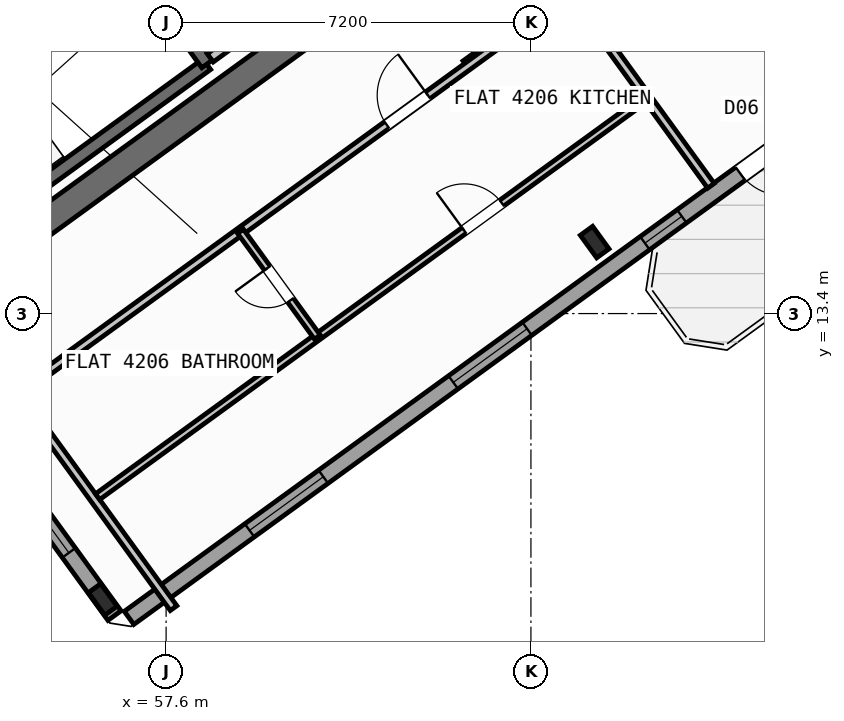
"""IFC4 building model, lengths in metres.
Left out: names, types, materials, properties, quantities, classifications, styles, units other than length and angle.
Written with IfcOpenShell. Run it as: python <this file> out.ifc"""

import sys

from ifc_helpers import new_model, si_unit, direction, frame, frame_2d, origin, origin_2d, place, context, subcontext, project, spatial, rectangle, i_section, extrude, source, transform, mapped, element, fill, save


model = new_model("IFC4")
c1 = context("Model", 3, precision=1e-05, world=origin(), true_north=direction((0.0, 1.0)))
c2 = subcontext(c1, "Body", "Model", "MODEL_VIEW")
j1 = project(units=[si_unit("LENGTHUNIT", "METRE"), si_unit("PLANEANGLEUNIT", "RADIAN")], contexts=[c1])
p1 = place(None, origin())
s1 = spatial("IfcSite", under=j1, at=p1, CompositionType="ELEMENT")
p2 = place(p1, origin())
s2 = spatial("IfcBuilding", under=s1, at=p2, CompositionType="ELEMENT")
p3 = place(p2, frame((0.0, 0.0, 165.9)))
s3 = spatial("IfcBuildingStorey", under=s2, at=p3, CompositionType="ELEMENT", Elevation=165.9)
p4 = place(p3, frame((52.359, 13.14, 0.0), z_axis=(0.0, 0.0, 1.0), x_axis=(0.809014896919, 0.587788139183, 0.0)))
e1 = element("IfcWall", 1, at=p4, inside=s3, PredefinedType="SHEAR", context=c2, shape_type="SweptSolid", body=[
    extrude(rectangle(XDim=12.34, YDim=0.55, at=frame_2d((6.17, 0.0))), origin(), (0.0, 0.0, 1.0), 3.32),
])
m1 = source(origin(), c2, "Body", "SweptSolid", [
    extrude(i_section(OverallWidth=0.3, OverallDepth=0.55, WebThickness=0.015, FlangeThickness=0.029, at=origin_2d()), origin(), (0.0, 0.0, 1.0), 3.6),
])
for number, where, z_axis, x_axis in (
    (2, (56.35, 7.758, 0.0), (0.0, 0.0, 1.0), (0.809, 0.588, 0.0)),
    (3, (66.058, 14.811, 0.0), (0.0, 0.0, 1.0), (0.809, 0.588, 0.0)),
):
    element("IfcColumn", number, at=place(p3, frame(where, z_axis=z_axis, x_axis=x_axis)), inside=s3, PredefinedType="COLUMN", context=c2, shape_type="MappedRepresentation", body=[
        mapped(m1, transform((0.0, 0.0, 0.0), scale=1.0)),
    ])
p5 = place(p3, frame((58.455, 35.484, 0.0), z_axis=(0.0, 0.0, 1.0), x_axis=(0.587783625747, -0.809018176127, 0.0)))
e4 = element("IfcWall", 4, at=p5, inside=s3, PredefinedType="STANDARD", context=c2, shape_type="SweptSolid", body=[
    extrude(rectangle(XDim=21.587, YDim=0.32, at=frame_2d((10.794, 0.0))), origin(), (0.0, 0.0, 1.0), 2.795),
])
p6 = place(p5, frame((1.475, 0.0, 0.8)))
e5 = element("IfcOpeningElement", 5, at=p6, cuts=e4, PredefinedType="OPENING", context=c2, shape_type="SweptSolid", body=[
    extrude(rectangle(XDim=2.1, YDim=1.55, at=frame_2d((1.05, 0.775))), frame((0.0, 0.17, 0.0), z_axis=(0.0, -1.0, 0.0), x_axis=(1.0, 0.0, 0.0)), (0.0, 0.0, 1.0), 0.34),
])
p7 = place(p5, frame((5.13, 0.0, 0.85)))
e6 = element("IfcOpeningElement", 6, at=p7, cuts=e4, PredefinedType="OPENING", context=c2, shape_type="SweptSolid", body=[
    extrude(rectangle(XDim=1.5, YDim=1.5, at=frame_2d((0.75, 0.75))), frame((0.0, 0.17, 0.0), z_axis=(0.0, -1.0, 0.0), x_axis=(1.0, 0.0, 0.0)), (0.0, 0.0, 1.0), 0.34),
])
p8 = place(p5, frame((8.929, 0.0, 0.85)))
e7 = element("IfcOpeningElement", 7, at=p8, cuts=e4, PredefinedType="OPENING", context=c2, shape_type="SweptSolid", body=[
    extrude(rectangle(XDim=1.5, YDim=1.5, at=frame_2d((0.75, 0.75))), frame((0.0, 0.17, 0.0), z_axis=(0.0, -1.0, 0.0), x_axis=(1.0, 0.0, 0.0)), (0.0, 0.0, 1.0), 0.34),
])
p9 = place(p5, frame((17.581, 0.0, 0.95)))
e8 = element("IfcOpeningElement", 8, at=p9, cuts=e4, PredefinedType="OPENING", context=c2, shape_type="SweptSolid", body=[
    extrude(rectangle(XDim=1.2, YDim=1.4, at=frame_2d((0.6, 0.7))), frame((0.0, 0.17, 0.0), z_axis=(0.0, -1.0, 0.0), x_axis=(1.0, 0.0, 0.0)), (0.0, 0.0, 1.0), 0.34),
])
p10 = place(p3, frame((71.098, 17.731, 0.0), z_axis=(0.0, 0.0, 1.0), x_axis=(-0.809021120468, -0.587779573171, 0.0)))
e9 = element("IfcWall", 9, at=p10, inside=s3, PredefinedType="STANDARD", context=c2, shape_type="SweptSolid", body=[
    extrude(rectangle(XDim=17.588, YDim=0.32, at=frame_2d((8.794, 0.0))), origin(), (0.0, 0.0, 1.0), 3.32),
])
p11 = place(p10, frame((1.624, 0.0, 0.0)))
e10 = element("IfcOpeningElement", 10, at=p11, cuts=e9, PredefinedType="OPENING", context=c2, shape_type="SweptSolid", body=[
    extrude(rectangle(XDim=1.05, YDim=2.15, at=frame_2d((0.525, 1.075))), frame((0.0, 0.17, 0.0), z_axis=(0.0, -1.0, 0.0), x_axis=(1.0, 0.0, 0.0)), (0.0, 0.0, 1.0), 0.34),
])
p12 = place(p10, frame((4.104, 0.0, 1.0)))
e11 = element("IfcOpeningElement", 11, at=p12, cuts=e9, PredefinedType="OPENING", context=c2, shape_type="SweptSolid", body=[
    extrude(rectangle(XDim=0.9, YDim=1.25, at=frame_2d((0.45, 0.625))), frame((0.0, 0.17, 0.0), z_axis=(0.0, -1.0, 0.0), x_axis=(1.0, 0.0, 0.0)), (0.0, 0.0, 1.0), 0.34),
])
p13 = place(p10, frame((7.879, 0.0, 0.85)))
e12 = element("IfcOpeningElement", 12, at=p13, cuts=e9, PredefinedType="OPENING", context=c2, shape_type="SweptSolid", body=[
    extrude(rectangle(XDim=1.8, YDim=1.5, at=frame_2d((0.9, 0.75))), frame((0.0, 0.17, 0.0), z_axis=(0.0, -1.0, 0.0), x_axis=(1.0, 0.0, 0.0)), (0.0, 0.0, 1.0), 0.34),
])
p14 = place(p10, frame((12.849, 0.0, 0.85)))
e13 = element("IfcOpeningElement", 13, at=p14, cuts=e9, PredefinedType="OPENING", context=c2, shape_type="SweptSolid", body=[
    extrude(rectangle(XDim=1.8, YDim=1.5, at=frame_2d((0.9, 0.75))), frame((0.0, 0.17, 0.0), z_axis=(0.0, -1.0, 0.0), x_axis=(1.0, 0.0, 0.0)), (0.0, 0.0, 1.0), 0.34),
])
p15 = place(p3, frame((56.581, 7.439, 0.0), z_axis=(0.0, 0.0, 1.0), x_axis=(-0.587771678454, 0.809026856172, 0.0)))
e14 = element("IfcWall", 14, at=p15, inside=s3, PredefinedType="STANDARD", context=c2, shape_type="SweptSolid", body=[
    extrude(rectangle(XDim=6.824, YDim=0.32, at=frame_2d((3.412, 0.0))), origin(), (0.0, 0.0, 1.0), 2.795),
])
p16 = place(p15, frame((1.531, 0.0, 0.8)))
e15 = element("IfcOpeningElement", 15, at=p16, cuts=e14, PredefinedType="OPENING", context=c2, shape_type="SweptSolid", body=[
    extrude(rectangle(XDim=2.1, YDim=1.55, at=frame_2d((1.05, 0.775))), frame((0.0, 0.17, 0.0), z_axis=(0.0, -1.0, 0.0), x_axis=(1.0, 0.0, 0.0)), (0.0, 0.0, 1.0), 0.34),
])
p17 = place(p3, frame((52.472, 14.013, 0.0), z_axis=(0.0, 0.0, 1.0), x_axis=(0.809028366311, 0.587769599847, 0.0)))
e16 = element("IfcWall", 16, at=p17, inside=s3, PredefinedType="SHEAR", context=c2, shape_type="SweptSolid", body=[
    extrude(rectangle(XDim=7.33, YDim=0.26, at=frame_2d((3.665, 0.0))), origin(), (0.0, 0.0, 1.0), 3.32),
])
p18 = place(p3, frame((50.615, 16.57, 0.0), z_axis=(0.0, 0.0, 1.0), x_axis=(0.809028366311, 0.587769599847, 0.0)))
e17 = element("IfcWall", 17, at=p18, inside=s3, PredefinedType="SHEAR", context=c2, shape_type="SweptSolid", body=[
    extrude(rectangle(XDim=7.33, YDim=0.26, at=frame_2d((3.665, 0.0))), origin(), (0.0, 0.0, 1.0), 3.32),
])
p19 = place(p18, frame((0.22, 0.0, 0.0)))
e18 = element("IfcOpeningElement", 18, at=p19, cuts=e17, PredefinedType="OPENING", context=c2, shape_type="SweptSolid", body=[
    extrude(rectangle(XDim=1.1, YDim=2.1, at=frame_2d((0.55, 1.05))), frame((0.0, 0.14, 0.0), z_axis=(0.0, -1.0, 0.0), x_axis=(1.0, 0.0, 0.0)), (0.0, 0.0, 1.0), 0.28),
])
p20 = place(p3, frame((58.41, 18.327, 0.0), z_axis=(0.0, 0.0, 1.0), x_axis=(-0.58776738483, 0.809029975545, 0.0)))
e19 = element("IfcWall", 19, at=p20, inside=s3, PredefinedType="SHEAR", context=c2, shape_type="SweptSolid", body=[
    extrude(rectangle(XDim=3.16, YDim=0.26, at=frame_2d((1.58, 0.0))), origin(), (0.0, 0.0, 1.0), 3.32),
])
p21 = place(p3, frame((58.472, 18.447, 0.0), z_axis=(0.0, 0.0, 1.0), x_axis=(0.809018631237, 0.587782999339, 0.0)))
e20 = element("IfcWall", 20, at=p21, inside=s3, PredefinedType="STANDARD", context=c2, shape_type="SweptSolid", body=[
    extrude(rectangle(XDim=3.698, YDim=0.2, at=frame_2d((1.849, 0.0))), origin(), (0.0, 0.0, 1.0), 3.31),
])
p22 = place(p3, frame((63.507, 18.322, 0.0), z_axis=(0.0, 0.0, 1.0), x_axis=(0.809034604122, 0.587761013791, 0.0)))
e21 = element("IfcWall", 21, at=p22, inside=s3, PredefinedType="PARTITIONING", context=c2, shape_type="SweptSolid", body=[
    extrude(rectangle(XDim=2.51, YDim=0.16, at=frame_2d((1.255, 0.0))), origin(), (0.0, 0.0, 1.0), 3.31),
])
p23 = place(p3, frame((68.353, 15.922, 0.0), z_axis=(0.0, 0.0, 1.0), x_axis=(-0.58776839458, 0.809029241952, 0.0)))
e22 = element("IfcWall", 22, at=p23, inside=s3, PredefinedType="PARTITIONING", context=c2, shape_type="SweptSolid", body=[
    extrude(rectangle(XDim=8.1, YDim=0.16, at=frame_2d((4.05, 0.0))), origin(), (0.0, 0.0, 1.0), 3.31),
])
p24 = place(p3, frame((53.705, 11.126, 0.0), z_axis=(0.0, 0.0, 1.0), x_axis=(0.809014504436, 0.587788679384, 0.0)))
e23 = element("IfcWall", 23, at=p24, inside=s3, PredefinedType="PARTITIONING", context=c2, shape_type="SweptSolid", body=[
    extrude(rectangle(XDim=14.67, YDim=0.16, at=frame_2d((7.335, 0.0))), origin(), (0.0, 0.0, 1.0), 3.31),
])
p25 = place(p24, frame((10.2, 0.0, 0.0)))
e24 = element("IfcOpeningElement", 24, at=p25, cuts=e23, PredefinedType="OPENING", context=c2, shape_type="SweptSolid", body=[
    extrude(rectangle(XDim=1.0, YDim=2.1, at=frame_2d((0.5, 1.05))), frame((0.0, 0.09, 0.0), z_axis=(0.0, -1.0, 0.0), x_axis=(1.0, 0.0, 0.0)), (0.0, 0.0, 1.0), 0.18),
])
p26 = place(p3, frame((57.747, 7.586, 0.0), z_axis=(0.0, 0.0, 1.0), x_axis=(-0.587784893399, 0.809017255126, 0.0)))
e25 = element("IfcWall", 25, at=p26, inside=s3, PredefinedType="PARTITIONING", context=c2, shape_type="SweptSolid", body=[
    extrude(rectangle(XDim=5.48, YDim=0.16, at=frame_2d((2.74, 0.0))), origin(), (0.0, 0.0, 1.0), 3.31),
])
p27 = place(p3, frame((56.249, 9.785, 0.0), z_axis=(0.0, 0.0, 1.0), x_axis=(0.809011747655, 0.587792473715, 0.0)))
e26 = element("IfcWall", 26, at=p27, inside=s3, PredefinedType="PLUMBINGWALL", context=c2, shape_type="SweptSolid", body=[
    extrude(rectangle(XDim=13.4, YDim=0.14, at=frame_2d((6.7, 0.0))), origin(), (0.0, 0.0, 1.0), 3.31),
])
p28 = place(p27, frame((8.94, 0.0, 0.0)))
e27 = element("IfcOpeningElement", 27, at=p28, cuts=e26, PredefinedType="OPENING", context=c2, shape_type="SweptSolid", body=[
    extrude(rectangle(XDim=0.92, YDim=2.08, at=frame_2d((0.46, 1.04))), frame((0.0, 0.08, 0.0), z_axis=(0.0, -1.0, 0.0), x_axis=(1.0, 0.0, 0.0)), (0.0, 0.0, 1.0), 0.16),
])
p29 = place(p3, frame((60.585, 12.936, 0.0), z_axis=(0.0, 0.0, 1.0), x_axis=(-0.587772116736, 0.809026537752, 0.0)))
e28 = element("IfcWall", 28, at=p29, inside=s3, PredefinedType="PLUMBINGWALL", context=c2, shape_type="SweptSolid", body=[
    extrude(rectangle(XDim=2.58, YDim=0.14, at=frame_2d((1.29, 0.0))), origin(), (0.0, 0.0, 1.0), 3.31),
])
p30 = place(p29, frame((0.9, 0.0, 0.0)))
e29 = element("IfcOpeningElement", 29, at=p30, cuts=e28, PredefinedType="OPENING", context=c2, shape_type="SweptSolid", body=[
    extrude(rectangle(XDim=0.78, YDim=2.05, at=frame_2d((0.39, 1.025))), frame((0.0, 0.08, 0.0), z_axis=(0.0, -1.0, 0.0), x_axis=(1.0, 0.0, 0.0)), (0.0, 0.0, 1.0), 0.16),
])
m2 = source(origin(), c2, "Body", "SweptSolid", [
    extrude(rectangle(XDim=1.05, YDim=2.15, at=frame_2d((0.525, 1.075))), frame((0.0, 0.025, 0.0), z_axis=(0.0, -1.0, 0.0), x_axis=(1.0, 0.0, 0.0)), (0.0, 0.0, 1.0), 0.05),
])
p31 = place(p11, origin())
e30 = element("IfcDoor", 30, at=p31, inside=s3, OperationType="SINGLE_SWING_LEFT", PredefinedType="DOOR", context=c2, shape_type="MappedRepresentation", body=[
    mapped(m2, transform((0.0, 0.0, 0.0), scale=1.0)),
])
fill(e10, e30)
m3 = source(origin(), c2, "Body", "SweptSolid", [
    extrude(rectangle(XDim=0.9, YDim=1.25, at=frame_2d((0.45, 0.625))), frame((0.0, 0.03, 0.0), z_axis=(0.0, -1.0, 0.0), x_axis=(1.0, 0.0, 0.0)), (0.0, 0.0, 1.0), 0.06),
])
p32 = place(p12, origin())
e31 = element("IfcWindow", 31, at=p32, inside=s3, PartitioningType="SINGLE_PANEL", PredefinedType="WINDOW", context=c2, shape_type="MappedRepresentation", body=[
    mapped(m3, transform((0.0, 0.0, 0.0), scale=1.0)),
])
fill(e11, e31)
m4 = source(origin(), c2, "Body", "SweptSolid", [
    extrude(rectangle(XDim=1.8, YDim=1.5, at=frame_2d((0.9, 0.75))), frame((0.0, 0.03, 0.0), z_axis=(0.0, -1.0, 0.0), x_axis=(1.0, 0.0, 0.0)), (0.0, 0.0, 1.0), 0.06),
])
p33 = place(p13, origin())
e32 = element("IfcWindow", 32, at=p33, inside=s3, PartitioningType="SINGLE_PANEL", PredefinedType="WINDOW", context=c2, shape_type="MappedRepresentation", body=[
    mapped(m4, transform((0.0, 0.0, 0.0), scale=1.0)),
])
fill(e12, e32)
p34 = place(p14, origin())
e33 = element("IfcWindow", 33, at=p34, inside=s3, PartitioningType="SINGLE_PANEL", PredefinedType="WINDOW", context=c2, shape_type="MappedRepresentation", body=[
    mapped(m4, transform((0.0, 0.0, 0.0), scale=1.0)),
])
fill(e13, e33)
m5 = source(origin(), c2, "Body", "SweptSolid", [
    extrude(rectangle(XDim=2.1, YDim=1.55, at=frame_2d((1.05, 0.775))), frame((0.0, 0.03, 0.0), z_axis=(0.0, -1.0, 0.0), x_axis=(1.0, 0.0, 0.0)), (0.0, 0.0, 1.0), 0.06),
])
p35 = place(p16, origin())
e34 = element("IfcWindow", 34, at=p35, inside=s3, PartitioningType="SINGLE_PANEL", PredefinedType="WINDOW", context=c2, shape_type="MappedRepresentation", body=[
    mapped(m5, transform((0.0, 0.0, 0.0), scale=1.0)),
])
fill(e15, e34)
m6 = source(origin(), c2, "Body", "SweptSolid", [
    extrude(rectangle(XDim=1.0, YDim=2.1, at=frame_2d((0.5, 1.05))), frame((0.0, 0.025, 0.0), z_axis=(0.0, -1.0, 0.0), x_axis=(1.0, 0.0, 0.0)), (0.0, 0.0, 1.0), 0.05),
])
p36 = place(p25, origin())
e35 = element("IfcDoor", 35, at=p36, inside=s3, OperationType="SINGLE_SWING_RIGHT", PredefinedType="DOOR", context=c2, shape_type="MappedRepresentation", body=[
    mapped(m6, transform((0.0, 0.0, 0.0), scale=1.0)),
])
fill(e24, e35)
m7 = source(origin(), c2, "Body", "SweptSolid", [
    extrude(rectangle(XDim=0.92, YDim=2.08, at=frame_2d((0.46, 1.04))), frame((0.0, 0.025, 0.0), z_axis=(0.0, -1.0, 0.0), x_axis=(1.0, 0.0, 0.0)), (0.0, 0.0, 1.0), 0.05),
])
p37 = place(p28, origin())
e36 = element("IfcDoor", 36, at=p37, inside=s3, OperationType="SINGLE_SWING_LEFT", PredefinedType="DOOR", context=c2, shape_type="MappedRepresentation", body=[
    mapped(m7, transform((0.0, 0.0, 0.0), scale=1.0)),
])
fill(e27, e36)
m8 = source(origin(), c2, "Body", "SweptSolid", [
    extrude(rectangle(XDim=0.78, YDim=2.05, at=frame_2d((0.39, 1.025))), frame((0.0, 0.025, 0.0), z_axis=(0.0, -1.0, 0.0), x_axis=(1.0, 0.0, 0.0)), (0.0, 0.0, 1.0), 0.05),
])
p38 = place(p30, origin())
e37 = element("IfcDoor", 37, at=p38, inside=s3, OperationType="SINGLE_SWING_RIGHT", PredefinedType="DOOR", context=c2, shape_type="MappedRepresentation", body=[
    mapped(m8, transform((0.0, 0.0, 0.0), scale=1.0)),
])
fill(e29, e37)
save(model, sys.argv[1])
